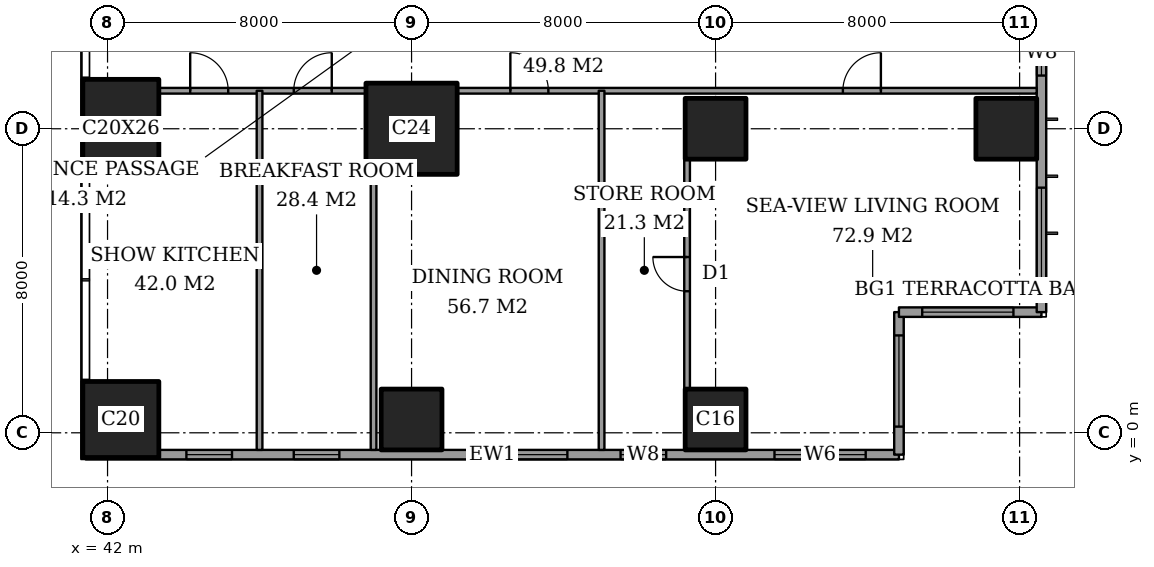
"""IFC4 building model, lengths in metres.
Left out: names, types, materials, properties, quantities, classifications, styles, units other than length and angle.
Written with IfcOpenShell. Run it as: python <this file> out.ifc"""

import sys

from ifc_helpers import new_model, si_unit, direction, frame, frame_2d, origin, origin_2d, place, context, subcontext, project, spatial, rectangle, extrude, element, fill, save


model = new_model("IFC4")
c1 = context("Model", 3, precision=1e-05, world=origin(), true_north=direction((0.0, 1.0)))
c2 = subcontext(c1, "Body", "Model", "MODEL_VIEW")
j1 = project(units=[si_unit("LENGTHUNIT", "METRE"), si_unit("PLANEANGLEUNIT", "RADIAN")], contexts=[c1])
p1 = place(None, origin())
s1 = spatial("IfcSite", under=j1, at=p1, CompositionType="ELEMENT")
p2 = place(p1, origin())
s2 = spatial("IfcBuilding", under=s1, at=p2, CompositionType="ELEMENT")
p3 = place(p2, frame((0.0, 0.0, 234.0)))
s3 = spatial("IfcBuildingStorey", under=s2, at=p3, CompositionType="ELEMENT", Elevation=234.0)
p4 = place(p3, frame((42.35, 0.35, 0.0), z_axis=(0.0, 0.0, 1.0), x_axis=(1.0, 0.0, 0.0)))
e1 = element("IfcColumn", 1, at=p4, inside=s3, PredefinedType="COLUMN", context=c2, shape_type="SweptSolid", body=[
    extrude(rectangle(XDim=2.0, YDim=2.0, at=origin_2d()), origin(), (0.0, 0.0, 1.0), 3.6),
])
p5 = place(p3, frame((42.35, 8.0, 0.0), z_axis=(0.0, 0.0, 1.0), x_axis=(1.0, 0.0, 0.0)))
e2 = element("IfcColumn", 2, at=p5, inside=s3, PredefinedType="COLUMN", context=c2, shape_type="SweptSolid", body=[
    extrude(rectangle(XDim=2.0, YDim=2.6, at=origin_2d()), origin(), (0.0, 0.0, 1.0), 3.6),
])
p6 = place(p3, frame((50.0, 0.35, 0.0), z_axis=(0.0, 0.0, 1.0), x_axis=(1.0, 0.0, 0.0)))
e3 = element("IfcColumn", 3, at=p6, inside=s3, PredefinedType="COLUMN", context=c2, shape_type="SweptSolid", body=[
    extrude(rectangle(XDim=1.6, YDim=1.6, at=origin_2d()), origin(), (0.0, 0.0, 1.0), 3.6),
])
p7 = place(p3, frame((50.0, 8.0, 0.0), z_axis=(0.0, 0.0, 1.0), x_axis=(1.0, 0.0, 0.0)))
e4 = element("IfcColumn", 4, at=p7, inside=s3, PredefinedType="COLUMN", context=c2, shape_type="SweptSolid", body=[
    extrude(rectangle(XDim=2.4, YDim=2.4, at=origin_2d()), origin(), (0.0, 0.0, 1.0), 3.6),
])
for number, where, z_axis, x_axis in (
    (5, (58.0, 0.35, 0.0), (0.0, 0.0, 1.0), (1.0, 0.0, 0.0)),
    (6, (58.0, 8.0, 0.0), (0.0, 0.0, 1.0), (1.0, 0.0, 0.0)),
    (7, (65.65, 8.0, 0.0), (0.0, 0.0, 1.0), (1.0, 0.0, 0.0)),
):
    element("IfcColumn", number, at=place(p3, frame(where, z_axis=z_axis, x_axis=x_axis)), inside=s3, PredefinedType="COLUMN", context=c2, shape_type="SweptSolid", body=[
        extrude(rectangle(XDim=1.6, YDim=1.6, at=origin_2d()), origin(), (0.0, 0.0, 1.0), 3.6),
    ])
p8 = place(p3, frame((41.425, -0.575, 0.0), z_axis=(0.0, 0.0, 1.0), x_axis=(1.0, 0.0, 0.0)))
e8 = element("IfcWall", 8, at=p8, inside=s3, PredefinedType="SOLIDWALL", context=c2, shape_type="SweptSolid", body=[
    extrude(rectangle(XDim=21.4, YDim=0.25, at=frame_2d((10.7, 0.0))), origin(), (0.0, 0.0, 1.0), 3.6),
])
p9 = place(p8, frame((2.65, 0.0, 0.6)))
e9 = element("IfcOpeningElement", 9, at=p9, cuts=e8, PredefinedType="OPENING", context=c2, shape_type="SweptSolid", body=[
    extrude(rectangle(XDim=1.2, YDim=2.0, at=frame_2d((0.6, 1.0))), frame((0.0, 0.135, 0.0), z_axis=(0.0, -1.0, 0.0), x_axis=(1.0, 0.0, 0.0)), (0.0, 0.0, 1.0), 0.27),
])
p10 = place(p8, frame((5.475, 0.0, 0.6)))
e10 = element("IfcOpeningElement", 10, at=p10, cuts=e8, PredefinedType="OPENING", context=c2, shape_type="SweptSolid", body=[
    extrude(rectangle(XDim=1.2, YDim=2.0, at=frame_2d((0.6, 1.0))), frame((0.0, 0.135, 0.0), z_axis=(0.0, -1.0, 0.0), x_axis=(1.0, 0.0, 0.0)), (0.0, 0.0, 1.0), 0.27),
])
p11 = place(p8, frame((10.275, 0.0, 0.6)))
e11 = element("IfcOpeningElement", 11, at=p11, cuts=e8, PredefinedType="OPENING", context=c2, shape_type="SweptSolid", body=[
    extrude(rectangle(XDim=2.4, YDim=2.0, at=frame_2d((1.2, 1.0))), frame((0.0, 0.135, 0.0), z_axis=(0.0, -1.0, 0.0), x_axis=(1.0, 0.0, 0.0)), (0.0, 0.0, 1.0), 0.27),
])
p12 = place(p8, frame((14.075, 0.0, 0.6)))
e12 = element("IfcOpeningElement", 12, at=p12, cuts=e8, PredefinedType="OPENING", context=c2, shape_type="SweptSolid", body=[
    extrude(rectangle(XDim=1.2, YDim=2.0, at=frame_2d((0.6, 1.0))), frame((0.0, 0.135, 0.0), z_axis=(0.0, -1.0, 0.0), x_axis=(1.0, 0.0, 0.0)), (0.0, 0.0, 1.0), 0.27),
])
p13 = place(p8, frame((18.125, 0.0, 0.6)))
e13 = element("IfcOpeningElement", 13, at=p13, cuts=e8, PredefinedType="OPENING", context=c2, shape_type="SweptSolid", body=[
    extrude(rectangle(XDim=2.4, YDim=2.0, at=frame_2d((1.2, 1.0))), frame((0.0, 0.135, 0.0), z_axis=(0.0, -1.0, 0.0), x_axis=(1.0, 0.0, 0.0)), (0.0, 0.0, 1.0), 0.27),
])
p14 = place(p3, frame((62.825, -0.575, 0.0), z_axis=(0.0, 0.0, 1.0), x_axis=(0.0, 1.0, 0.0)))
e14 = element("IfcWall", 14, at=p14, inside=s3, PredefinedType="SOLIDWALL", context=c2, shape_type="SweptSolid", body=[
    extrude(rectangle(XDim=3.75, YDim=0.25, at=frame_2d((1.875, 0.0))), origin(), (0.0, 0.0, 1.0), 3.6),
])
p15 = place(p14, frame((0.738, 0.0, 0.6)))
e15 = element("IfcOpeningElement", 15, at=p15, cuts=e14, PredefinedType="OPENING", context=c2, shape_type="SweptSolid", body=[
    extrude(rectangle(XDim=2.4, YDim=2.0, at=frame_2d((1.2, 1.0))), frame((0.0, 0.135, 0.0), z_axis=(0.0, -1.0, 0.0), x_axis=(1.0, 0.0, 0.0)), (0.0, 0.0, 1.0), 0.27),
])
p16 = place(p3, frame((62.825, 3.175, 0.0), z_axis=(0.0, 0.0, 1.0), x_axis=(1.0, 0.0, 0.0)))
e16 = element("IfcWall", 16, at=p16, inside=s3, PredefinedType="SOLIDWALL", context=c2, shape_type="SweptSolid", body=[
    extrude(rectangle(XDim=3.75, YDim=0.25, at=frame_2d((1.875, 0.0))), origin(), (0.0, 0.0, 1.0), 3.6),
])
p17 = place(p16, frame((0.613, 0.0, 0.6)))
e17 = element("IfcOpeningElement", 17, at=p17, cuts=e16, PredefinedType="OPENING", context=c2, shape_type="SweptSolid", body=[
    extrude(rectangle(XDim=2.4, YDim=2.0, at=frame_2d((1.2, 1.0))), frame((0.0, 0.135, 0.0), z_axis=(0.0, -1.0, 0.0), x_axis=(1.0, 0.0, 0.0)), (0.0, 0.0, 1.0), 0.27),
])
p18 = place(p3, frame((66.575, 3.175, 0.0), z_axis=(0.0, 0.0, 1.0), x_axis=(0.0, 1.0, 0.0)))
e18 = element("IfcWall", 18, at=p18, inside=s3, PredefinedType="SOLIDWALL", context=c2, shape_type="SweptSolid", body=[
    extrude(rectangle(XDim=41.65, YDim=0.25, at=frame_2d((20.825, 0.0))), origin(), (0.0, 0.0, 1.0), 3.6),
])
p19 = place(p18, frame((0.875, 0.0, 0.6)))
e19 = element("IfcOpeningElement", 19, at=p19, cuts=e18, PredefinedType="OPENING", context=c2, shape_type="SweptSolid", body=[
    extrude(rectangle(XDim=2.4, YDim=2.0, at=frame_2d((1.2, 1.0))), frame((0.0, 0.135, 0.0), z_axis=(0.0, -1.0, 0.0), x_axis=(1.0, 0.0, 0.0)), (0.0, 0.0, 1.0), 0.27),
])
p20 = place(p18, frame((6.225, 0.0, 0.6)))
e20 = element("IfcOpeningElement", 20, at=p20, cuts=e18, PredefinedType="OPENING", context=c2, shape_type="SweptSolid", body=[
    extrude(rectangle(XDim=1.2, YDim=2.0, at=frame_2d((0.6, 1.0))), frame((0.0, 0.135, 0.0), z_axis=(0.0, -1.0, 0.0), x_axis=(1.0, 0.0, 0.0)), (0.0, 0.0, 1.0), 0.27),
])
p21 = place(p18, frame((8.725, 0.0, 0.6)))
e21 = element("IfcOpeningElement", 21, at=p21, cuts=e18, PredefinedType="OPENING", context=c2, shape_type="SweptSolid", body=[
    extrude(rectangle(XDim=2.4, YDim=2.0, at=frame_2d((1.2, 1.0))), frame((0.0, 0.135, 0.0), z_axis=(0.0, -1.0, 0.0), x_axis=(1.0, 0.0, 0.0)), (0.0, 0.0, 1.0), 0.27),
])
p22 = place(p18, frame((15.725, 0.0, 0.6)))
e22 = element("IfcOpeningElement", 22, at=p22, cuts=e18, PredefinedType="OPENING", context=c2, shape_type="SweptSolid", body=[
    extrude(rectangle(XDim=2.4, YDim=2.0, at=frame_2d((1.2, 1.0))), frame((0.0, 0.135, 0.0), z_axis=(0.0, -1.0, 0.0), x_axis=(1.0, 0.0, 0.0)), (0.0, 0.0, 1.0), 0.27),
])
p23 = place(p18, frame((23.525, 0.0, 0.6)))
e23 = element("IfcOpeningElement", 23, at=p23, cuts=e18, PredefinedType="OPENING", context=c2, shape_type="SweptSolid", body=[
    extrude(rectangle(XDim=2.4, YDim=2.0, at=frame_2d((1.2, 1.0))), frame((0.0, 0.135, 0.0), z_axis=(0.0, -1.0, 0.0), x_axis=(1.0, 0.0, 0.0)), (0.0, 0.0, 1.0), 0.27),
])
p24 = place(p18, frame((30.725, 0.0, 0.6)))
e24 = element("IfcOpeningElement", 24, at=p24, cuts=e18, PredefinedType="OPENING", context=c2, shape_type="SweptSolid", body=[
    extrude(rectangle(XDim=2.4, YDim=2.0, at=frame_2d((1.2, 1.0))), frame((0.0, 0.135, 0.0), z_axis=(0.0, -1.0, 0.0), x_axis=(1.0, 0.0, 0.0)), (0.0, 0.0, 1.0), 0.27),
])
p25 = place(p18, frame((34.525, 0.0, 0.6)))
e25 = element("IfcOpeningElement", 25, at=p25, cuts=e18, PredefinedType="OPENING", context=c2, shape_type="SweptSolid", body=[
    extrude(rectangle(XDim=1.2, YDim=2.0, at=frame_2d((0.6, 1.0))), frame((0.0, 0.135, 0.0), z_axis=(0.0, -1.0, 0.0), x_axis=(1.0, 0.0, 0.0)), (0.0, 0.0, 1.0), 0.27),
])
p26 = place(p18, frame((38.375, 0.0, 0.6)))
e26 = element("IfcOpeningElement", 26, at=p26, cuts=e18, PredefinedType="OPENING", context=c2, shape_type="SweptSolid", body=[
    extrude(rectangle(XDim=2.4, YDim=2.0, at=frame_2d((1.2, 1.0))), frame((0.0, 0.135, 0.0), z_axis=(0.0, -1.0, 0.0), x_axis=(1.0, 0.0, 0.0)), (0.0, 0.0, 1.0), 0.27),
])
p27 = place(p3, frame((43.35, 9.0, 0.0), z_axis=(0.0, 0.0, 1.0), x_axis=(1.0, 0.0, 0.0)))
e27 = element("IfcWall", 27, at=p27, inside=s3, PredefinedType="PARTITIONING", context=c2, shape_type="SweptSolid", body=[
    extrude(rectangle(XDim=5.45, YDim=0.15, at=frame_2d((2.725, 0.0))), origin(), (0.0, 0.0, 1.0), 3.35),
])
p28 = place(p27, frame((3.55, 0.0, 0.0)))
e28 = element("IfcOpeningElement", 28, at=p28, cuts=e27, PredefinedType="OPENING", context=c2, shape_type="SweptSolid", body=[
    extrude(rectangle(XDim=1.0, YDim=2.1, at=frame_2d((0.5, 1.05))), frame((0.0, 0.085, 0.0), z_axis=(0.0, -1.0, 0.0), x_axis=(1.0, 0.0, 0.0)), (0.0, 0.0, 1.0), 0.17),
])
p29 = place(p27, frame((0.825, 0.0, 0.0)))
e29 = element("IfcOpeningElement", 29, at=p29, cuts=e27, PredefinedType="OPENING", context=c2, shape_type="SweptSolid", body=[
    extrude(rectangle(XDim=1.0, YDim=2.1, at=frame_2d((0.5, 1.05))), frame((0.0, 0.085, 0.0), z_axis=(0.0, -1.0, 0.0), x_axis=(1.0, 0.0, 0.0)), (0.0, 0.0, 1.0), 0.17),
])
p30 = place(p3, frame((51.2, 9.0, 0.0), z_axis=(0.0, 0.0, 1.0), x_axis=(1.0, 0.0, 0.0)))
e30 = element("IfcWall", 30, at=p30, inside=s3, PredefinedType="PARTITIONING", context=c2, shape_type="SweptSolid", body=[
    extrude(rectangle(XDim=15.25, YDim=0.15, at=frame_2d((7.625, 0.0))), origin(), (0.0, 0.0, 1.0), 3.35),
])
p31 = place(p30, frame((10.15, 0.0, 0.0)))
e31 = element("IfcOpeningElement", 31, at=p31, cuts=e30, PredefinedType="OPENING", context=c2, shape_type="SweptSolid", body=[
    extrude(rectangle(XDim=1.0, YDim=2.1, at=frame_2d((0.5, 1.05))), frame((0.0, 0.085, 0.0), z_axis=(0.0, -1.0, 0.0), x_axis=(1.0, 0.0, 0.0)), (0.0, 0.0, 1.0), 0.17),
])
p32 = place(p30, frame((1.4, 0.0, 0.0)))
e32 = element("IfcOpeningElement", 32, at=p32, cuts=e30, PredefinedType="OPENING", context=c2, shape_type="SweptSolid", body=[
    extrude(rectangle(XDim=1.0, YDim=2.1, at=frame_2d((0.5, 1.05))), frame((0.0, 0.085, 0.0), z_axis=(0.0, -1.0, 0.0), x_axis=(1.0, 0.0, 0.0)), (0.0, 0.0, 1.0), 0.17),
])
p33 = place(p3, frame((46.0, -0.45, 0.0), z_axis=(0.0, 0.0, 1.0), x_axis=(0.0, 1.0, 0.0)))
e33 = element("IfcWall", 33, at=p33, inside=s3, PredefinedType="PARTITIONING", context=c2, shape_type="SweptSolid", body=[
    extrude(rectangle(XDim=9.45, YDim=0.15, at=frame_2d((4.725, 0.0))), origin(), (0.0, 0.0, 1.0), 3.35),
])
p34 = place(p3, frame((49.0, -0.45, 0.0), z_axis=(0.0, 0.0, 1.0), x_axis=(0.0, 1.0, 0.0)))
e34 = element("IfcWall", 34, at=p34, inside=s3, PredefinedType="PARTITIONING", context=c2, shape_type="SweptSolid", body=[
    extrude(rectangle(XDim=7.25, YDim=0.15, at=frame_2d((3.625, 0.0))), origin(), (0.0, 0.0, 1.0), 3.35),
])
p35 = place(p3, frame((55.0, -0.45, 0.0), z_axis=(0.0, 0.0, 1.0), x_axis=(0.0, 1.0, 0.0)))
e35 = element("IfcWall", 35, at=p35, inside=s3, PredefinedType="PARTITIONING", context=c2, shape_type="SweptSolid", body=[
    extrude(rectangle(XDim=9.45, YDim=0.15, at=frame_2d((4.725, 0.0))), origin(), (0.0, 0.0, 1.0), 3.35),
])
p36 = place(p3, frame((57.25, 1.15, 0.0), z_axis=(0.0, 0.0, 1.0), x_axis=(0.0, 1.0, 0.0)))
e36 = element("IfcWall", 36, at=p36, inside=s3, PredefinedType="PARTITIONING", context=c2, shape_type="SweptSolid", body=[
    extrude(rectangle(XDim=6.05, YDim=0.15, at=frame_2d((3.025, 0.0))), origin(), (0.0, 0.0, 1.0), 3.35),
])
p37 = place(p36, frame((2.575, 0.0, 0.0)))
e37 = element("IfcOpeningElement", 37, at=p37, cuts=e36, PredefinedType="OPENING", context=c2, shape_type="SweptSolid", body=[
    extrude(rectangle(XDim=0.9, YDim=2.1, at=frame_2d((0.45, 1.05))), frame((0.0, 0.085, 0.0), z_axis=(0.0, -1.0, 0.0), x_axis=(1.0, 0.0, 0.0)), (0.0, 0.0, 1.0), 0.17),
])
p38 = place(p9, origin())
e38 = element("IfcWindow", 38, at=p38, inside=s3, PartitioningType="SINGLE_PANEL", PredefinedType="WINDOW", context=c2, shape_type="SweptSolid", body=[
    extrude(rectangle(XDim=1.2, YDim=2.0, at=frame_2d((0.6, 1.0))), frame((0.0, 0.03, 0.0), z_axis=(0.0, -1.0, 0.0), x_axis=(1.0, 0.0, 0.0)), (0.0, 0.0, 1.0), 0.06),
])
fill(e9, e38)
p39 = place(p10, origin())
e39 = element("IfcWindow", 39, at=p39, inside=s3, PartitioningType="SINGLE_PANEL", PredefinedType="WINDOW", context=c2, shape_type="SweptSolid", body=[
    extrude(rectangle(XDim=1.2, YDim=2.0, at=frame_2d((0.6, 1.0))), frame((0.0, 0.03, 0.0), z_axis=(0.0, -1.0, 0.0), x_axis=(1.0, 0.0, 0.0)), (0.0, 0.0, 1.0), 0.06),
])
fill(e10, e39)
p40 = place(p11, origin())
e40 = element("IfcWindow", 40, at=p40, inside=s3, PartitioningType="SINGLE_PANEL", PredefinedType="WINDOW", context=c2, shape_type="SweptSolid", body=[
    extrude(rectangle(XDim=2.4, YDim=2.0, at=frame_2d((1.2, 1.0))), frame((0.0, 0.03, 0.0), z_axis=(0.0, -1.0, 0.0), x_axis=(1.0, 0.0, 0.0)), (0.0, 0.0, 1.0), 0.06),
])
fill(e11, e40)
p41 = place(p12, origin())
e41 = element("IfcWindow", 41, at=p41, inside=s3, PartitioningType="SINGLE_PANEL", PredefinedType="WINDOW", context=c2, shape_type="SweptSolid", body=[
    extrude(rectangle(XDim=1.2, YDim=2.0, at=frame_2d((0.6, 1.0))), frame((0.0, 0.03, 0.0), z_axis=(0.0, -1.0, 0.0), x_axis=(1.0, 0.0, 0.0)), (0.0, 0.0, 1.0), 0.06),
])
fill(e12, e41)
p42 = place(p13, origin())
e42 = element("IfcWindow", 42, at=p42, inside=s3, PartitioningType="SINGLE_PANEL", PredefinedType="WINDOW", context=c2, shape_type="SweptSolid", body=[
    extrude(rectangle(XDim=2.4, YDim=2.0, at=frame_2d((1.2, 1.0))), frame((0.0, 0.03, 0.0), z_axis=(0.0, -1.0, 0.0), x_axis=(1.0, 0.0, 0.0)), (0.0, 0.0, 1.0), 0.06),
])
fill(e13, e42)
p43 = place(p15, origin())
e43 = element("IfcWindow", 43, at=p43, inside=s3, PartitioningType="SINGLE_PANEL", PredefinedType="WINDOW", context=c2, shape_type="SweptSolid", body=[
    extrude(rectangle(XDim=2.4, YDim=2.0, at=frame_2d((1.2, 1.0))), frame((0.0, 0.03, 0.0), z_axis=(0.0, -1.0, 0.0), x_axis=(1.0, 0.0, 0.0)), (0.0, 0.0, 1.0), 0.06),
])
fill(e15, e43)
p44 = place(p17, origin())
e44 = element("IfcWindow", 44, at=p44, inside=s3, PartitioningType="SINGLE_PANEL", PredefinedType="WINDOW", context=c2, shape_type="SweptSolid", body=[
    extrude(rectangle(XDim=2.4, YDim=2.0, at=frame_2d((1.2, 1.0))), frame((0.0, 0.03, 0.0), z_axis=(0.0, -1.0, 0.0), x_axis=(1.0, 0.0, 0.0)), (0.0, 0.0, 1.0), 0.06),
])
fill(e17, e44)
p45 = place(p19, origin())
e45 = element("IfcWindow", 45, at=p45, inside=s3, PartitioningType="SINGLE_PANEL", PredefinedType="WINDOW", context=c2, shape_type="SweptSolid", body=[
    extrude(rectangle(XDim=2.4, YDim=2.0, at=frame_2d((1.2, 1.0))), frame((0.0, 0.03, 0.0), z_axis=(0.0, -1.0, 0.0), x_axis=(1.0, 0.0, 0.0)), (0.0, 0.0, 1.0), 0.06),
])
fill(e19, e45)
p46 = place(p20, origin())
e46 = element("IfcWindow", 46, at=p46, inside=s3, PartitioningType="SINGLE_PANEL", PredefinedType="WINDOW", context=c2, shape_type="SweptSolid", body=[
    extrude(rectangle(XDim=1.2, YDim=2.0, at=frame_2d((0.6, 1.0))), frame((0.0, 0.03, 0.0), z_axis=(0.0, -1.0, 0.0), x_axis=(1.0, 0.0, 0.0)), (0.0, 0.0, 1.0), 0.06),
])
fill(e20, e46)
p47 = place(p31, origin())
e47 = element("IfcDoor", 47, at=p47, inside=s3, OperationType="SINGLE_SWING_LEFT", PredefinedType="DOOR", context=c2, shape_type="SweptSolid", body=[
    extrude(rectangle(XDim=1.0, YDim=2.1, at=frame_2d((0.5, 1.05))), frame((0.0, 0.025, 0.0), z_axis=(0.0, -1.0, 0.0), x_axis=(1.0, 0.0, 0.0)), (0.0, 0.0, 1.0), 0.05),
])
fill(e31, e47)
p48 = place(p37, origin())
e48 = element("IfcDoor", 48, at=p48, inside=s3, OperationType="SINGLE_SWING_LEFT", PredefinedType="DOOR", context=c2, shape_type="SweptSolid", body=[
    extrude(rectangle(XDim=0.9, YDim=2.1, at=frame_2d((0.45, 1.05))), frame((0.0, 0.025, 0.0), z_axis=(0.0, -1.0, 0.0), x_axis=(1.0, 0.0, 0.0)), (0.0, 0.0, 1.0), 0.05),
])
fill(e37, e48)
p49 = place(p32, origin())
e49 = element("IfcDoor", 49, at=p49, inside=s3, OperationType="SINGLE_SWING_RIGHT", PredefinedType="DOOR", context=c2, shape_type="SweptSolid", body=[
    extrude(rectangle(XDim=1.0, YDim=2.1, at=frame_2d((0.5, 1.05))), frame((0.0, 0.025, 0.0), z_axis=(0.0, -1.0, 0.0), x_axis=(1.0, 0.0, 0.0)), (0.0, 0.0, 1.0), 0.05),
])
fill(e32, e49)
p50 = place(p28, origin())
e50 = element("IfcDoor", 50, at=p50, inside=s3, OperationType="SINGLE_SWING_LEFT", PredefinedType="DOOR", context=c2, shape_type="SweptSolid", body=[
    extrude(rectangle(XDim=1.0, YDim=2.1, at=frame_2d((0.5, 1.05))), frame((0.0, 0.025, 0.0), z_axis=(0.0, -1.0, 0.0), x_axis=(1.0, 0.0, 0.0)), (0.0, 0.0, 1.0), 0.05),
])
fill(e28, e50)
p51 = place(p29, origin())
e51 = element("IfcDoor", 51, at=p51, inside=s3, OperationType="SINGLE_SWING_RIGHT", PredefinedType="DOOR", context=c2, shape_type="SweptSolid", body=[
    extrude(rectangle(XDim=1.0, YDim=2.1, at=frame_2d((0.5, 1.05))), frame((0.0, 0.025, 0.0), z_axis=(0.0, -1.0, 0.0), x_axis=(1.0, 0.0, 0.0)), (0.0, 0.0, 1.0), 0.05),
])
fill(e29, e51)
save(model, sys.argv[1])
